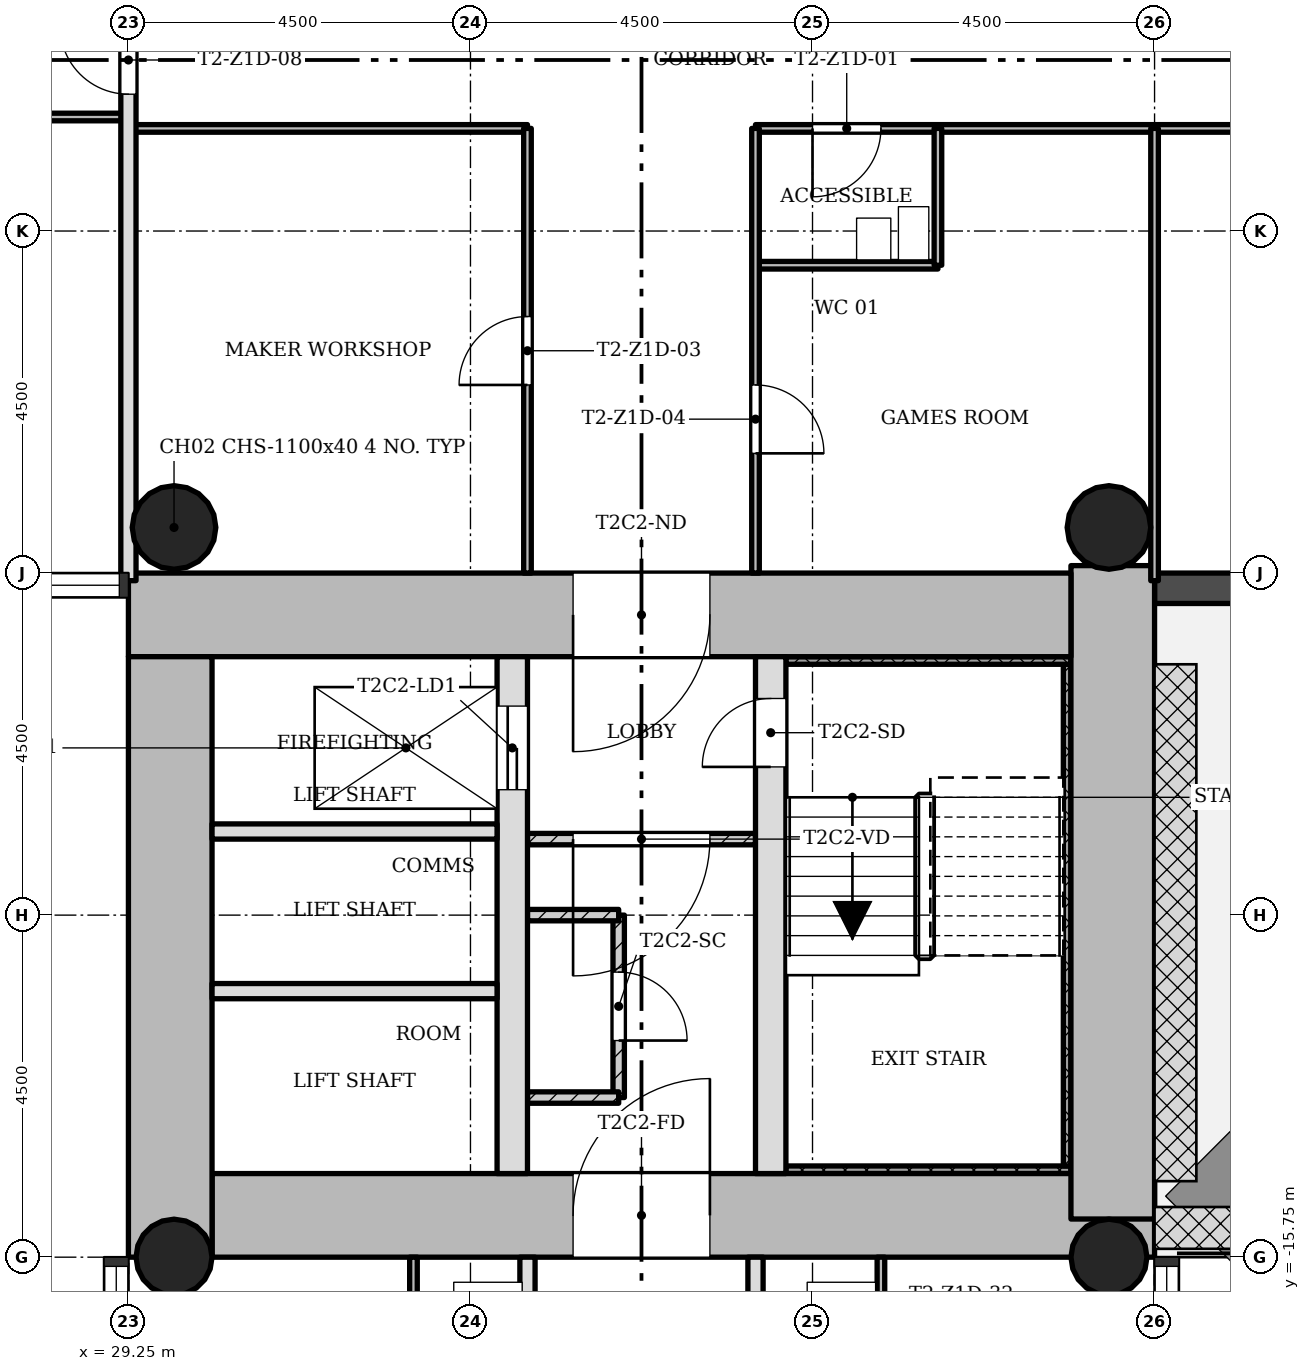
"""IFC4 building model, lengths in metres.
Left out: names, types, materials, properties, quantities, classifications, styles, units other than length and angle.
Written with IfcOpenShell. Run it as: python <this file> out.ifc"""

import sys

from ifc_helpers import new_model, si_unit, direction, frame, frame_2d, origin, origin_2d, place, context, subcontext, project, spatial, rectangle, hollow_circle, extrude, element, fill, save


model = new_model("IFC4")
c1 = context("Model", 3, precision=1e-05, world=origin(), true_north=direction((0.0, 1.0)))
c2 = subcontext(c1, "Body", "Model", "MODEL_VIEW")
j1 = project(units=[si_unit("LENGTHUNIT", "METRE"), si_unit("PLANEANGLEUNIT", "RADIAN")], contexts=[c1])
p1 = place(None, origin())
s1 = spatial("IfcSite", under=j1, at=p1, CompositionType="ELEMENT")
p2 = place(p1, origin())
s2 = spatial("IfcBuilding", under=s1, at=p2, CompositionType="ELEMENT")
p3 = place(p2, frame((0.0, 0.0, 58.5)))
s3 = spatial("IfcBuildingStorey", under=s2, at=p3, CompositionType="ELEMENT", Elevation=58.5)
p4 = place(p3, frame((30.35, -15.2, 0.0), z_axis=(0.0, 0.0, 1.0), x_axis=(1.0, 0.0, 0.0)))
e1 = element("IfcWall", 1, at=p4, inside=s3, PredefinedType="SHEAR", context=c2, shape_type="SweptSolid", body=[
    extrude(rectangle(XDim=12.4, YDim=1.1, at=frame_2d((6.2, 0.0))), origin(), (0.0, 0.0, 1.0), 3.4),
])
p5 = place(p4, frame((4.75, 0.0, 0.0)))
e2 = element("IfcOpeningElement", 2, at=p5, cuts=e1, PredefinedType="OPENING", context=c2, shape_type="SweptSolid", body=[
    extrude(rectangle(XDim=1.8, YDim=2.1, at=frame_2d((0.9, 1.05))), frame((0.0, 0.56, 0.0), z_axis=(0.0, -1.0, 0.0), x_axis=(1.0, 0.0, 0.0)), (0.0, 0.0, 1.0), 1.12),
])
p6 = place(p3, frame((42.2, -15.248, 0.0), z_axis=(0.0, 0.0, 1.0), x_axis=(0.0, 1.0, 0.0)))
e3 = element("IfcWall", 3, at=p6, inside=s3, PredefinedType="SHEAR", context=c2, shape_type="SweptSolid", body=[
    extrude(rectangle(XDim=8.596, YDim=1.1, at=frame_2d((4.298, 0.0))), origin(), (0.0, 0.0, 1.0), 3.4),
])
p7 = place(p3, frame((41.65, -7.3, 0.0), z_axis=(0.0, 0.0, 1.0), x_axis=(-1.0, 0.0, 0.0)))
e4 = element("IfcWall", 4, at=p7, inside=s3, PredefinedType="SHEAR", context=c2, shape_type="SweptSolid", body=[
    extrude(rectangle(XDim=12.4, YDim=1.1, at=frame_2d((6.2, 0.0))), origin(), (0.0, 0.0, 1.0), 3.4),
])
p8 = place(p7, frame((4.75, 0.0, 0.0)))
e5 = element("IfcOpeningElement", 5, at=p8, cuts=e4, PredefinedType="OPENING", context=c2, shape_type="SweptSolid", body=[
    extrude(rectangle(XDim=1.8, YDim=2.1, at=frame_2d((0.9, 1.05))), frame((0.0, 0.56, 0.0), z_axis=(0.0, -1.0, 0.0), x_axis=(1.0, 0.0, 0.0)), (0.0, 0.0, 1.0), 1.12),
])
p9 = place(p3, frame((29.8, -7.85, 0.0), z_axis=(0.0, 0.0, 1.0), x_axis=(0.0, -1.0, 0.0)))
e6 = element("IfcWall", 6, at=p9, inside=s3, PredefinedType="SHEAR", context=c2, shape_type="SweptSolid", body=[
    extrude(rectangle(XDim=7.9, YDim=1.1, at=frame_2d((3.95, 0.0))), origin(), (0.0, 0.0, 1.0), 3.4),
])
p10 = place(p3, frame((34.3, -14.65, 0.0), z_axis=(0.0, 0.0, 1.0), x_axis=(0.0, 1.0, 0.0)))
e7 = element("IfcWall", 7, at=p10, inside=s3, PredefinedType="SHEAR", context=c2, shape_type="SweptSolid", body=[
    extrude(rectangle(XDim=6.8, YDim=0.4, at=frame_2d((3.4, 0.0))), origin(), (0.0, 0.0, 1.0), 3.4),
])
p11 = place(p10, frame((5.05, 0.0, 0.0)))
e8 = element("IfcOpeningElement", 8, at=p11, cuts=e7, PredefinedType="OPENING", context=c2, shape_type="SweptSolid", body=[
    extrude(rectangle(XDim=1.1, YDim=2.1, at=frame_2d((0.55, 1.05))), frame((0.0, 0.21, 0.0), z_axis=(0.0, -1.0, 0.0), x_axis=(1.0, 0.0, 0.0)), (0.0, 0.0, 1.0), 0.42),
])
p12 = place(p3, frame((37.7, -14.65, 0.0), z_axis=(0.0, 0.0, 1.0), x_axis=(0.0, 1.0, 0.0)))
e9 = element("IfcWall", 9, at=p12, inside=s3, PredefinedType="SHEAR", context=c2, shape_type="SweptSolid", body=[
    extrude(rectangle(XDim=6.8, YDim=0.4, at=frame_2d((3.4, 0.0))), origin(), (0.0, 0.0, 1.0), 3.4),
])
p13 = place(p12, frame((5.35, 0.0, 0.0)))
e10 = element("IfcOpeningElement", 10, at=p13, cuts=e9, PredefinedType="OPENING", context=c2, shape_type="SweptSolid", body=[
    extrude(rectangle(XDim=0.9, YDim=2.1, at=frame_2d((0.45, 1.05))), frame((0.0, 0.21, 0.0), z_axis=(0.0, -1.0, 0.0), x_axis=(1.0, 0.0, 0.0)), (0.0, 0.0, 1.0), 0.42),
])
for number, where, z_axis, x_axis in (
    (11, (42.15, -15.75, 0.0), (0.0, 0.0, 1.0), (1.0, 0.0, 0.0)),
    (12, (29.85, -15.75, 0.0), (0.0, 0.0, 1.0), (1.0, 0.0, 0.0)),
):
    element("IfcColumn", number, at=place(p3, frame(where, z_axis=z_axis, x_axis=x_axis)), inside=s3, PredefinedType="COLUMN", context=c2, shape_type="SweptSolid", body=[
        extrude(hollow_circle(Radius=0.5, WallThickness=0.036, at=origin_2d()), origin(), (0.0, 0.0, 1.0), 3.4),
    ])
for number, where, z_axis, x_axis in (
    (13, (42.15, -6.15, 0.0), (0.0, 0.0, 1.0), (1.0, 0.0, 0.0)),
    (14, (29.85, -6.15, 0.0), (0.0, 0.0, 1.0), (1.0, 0.0, 0.0)),
):
    element("IfcColumn", number, at=place(p3, frame(where, z_axis=z_axis, x_axis=x_axis)), inside=s3, PredefinedType="COLUMN", context=c2, shape_type="SweptSolid", body=[
        extrude(hollow_circle(Radius=0.55, WallThickness=0.04, at=origin_2d()), origin(), (0.0, 0.0, 1.0), 3.4),
    ])
p14 = place(p3, frame((42.75, -6.95, -0.02), z_axis=(0.0, 0.0, 1.0), x_axis=(1.0, 0.0, 0.0)))
e15 = element("IfcWall", 15, at=p14, inside=s3, PredefinedType="STANDARD", context=c2, shape_type="SweptSolid", body=[
    extrude(rectangle(XDim=4.5, YDim=0.4, at=frame_2d((2.25, 0.0))), origin(), (0.0, 0.0, 1.0), 3.12),
])
p15 = place(p14, frame((1.35, 0.0, 0.02)))
e16 = element("IfcOpeningElement", 16, at=p15, cuts=e15, PredefinedType="OPENING", context=c2, shape_type="SweptSolid", body=[
    extrude(rectangle(XDim=1.8, YDim=2.1, at=frame_2d((0.9, 1.05))), frame((0.0, 0.21, 0.0), z_axis=(0.0, -1.0, 0.0), x_axis=(1.0, 0.0, 0.0)), (0.0, 0.0, 1.0), 0.42),
])
p16 = place(p3, frame((34.5, -10.25, 0.0), z_axis=(0.0, 0.0, 1.0), x_axis=(1.0, 0.0, 0.0)))
e17 = element("IfcWall", 17, at=p16, inside=s3, PredefinedType="PARTITIONING", context=c2, shape_type="SweptSolid", body=[
    extrude(rectangle(XDim=3.0, YDim=0.15, at=frame_2d((1.5, 0.0))), origin(), (0.0, 0.0, 1.0), 3.0),
])
p17 = place(p16, frame((0.6, 0.0, 0.0)))
e18 = element("IfcOpeningElement", 18, at=p17, cuts=e17, PredefinedType="OPENING", context=c2, shape_type="SweptSolid", body=[
    extrude(rectangle(XDim=1.8, YDim=2.1, at=frame_2d((0.9, 1.05))), frame((0.0, 0.085, 0.0), z_axis=(0.0, -1.0, 0.0), x_axis=(1.0, 0.0, 0.0)), (0.0, 0.0, 1.0), 0.17),
])
for number, where, z_axis, x_axis in (
    (19, (30.35, -10.15, 0.0), (0.0, 0.0, 1.0), (1.0, 0.0, 0.0)),
    (20, (30.35, -12.25, 0.0), (0.0, 0.0, 1.0), (1.0, 0.0, 0.0)),
):
    element("IfcWall", number, at=place(p3, frame(where, z_axis=z_axis, x_axis=x_axis)), inside=s3, PredefinedType="SOLIDWALL", context=c2, shape_type="SweptSolid", body=[
        extrude(rectangle(XDim=3.75, YDim=0.2, at=frame_2d((1.875, 0.0))), origin(), (0.0, 0.0, 1.0), 3.0),
    ])
p18 = place(p3, frame((35.7, -11.25, 0.0), z_axis=(0.0, 0.0, 1.0), x_axis=(0.0, -1.0, 0.0)))
e21 = element("IfcWall", 21, at=p18, inside=s3, PredefinedType="PARTITIONING", context=c2, shape_type="SweptSolid", body=[
    extrude(rectangle(XDim=2.4, YDim=0.15, at=frame_2d((1.2, 0.0))), origin(), (0.0, 0.0, 1.0), 3.0),
])
p19 = place(p18, frame((0.75, 0.0, 0.0)))
e22 = element("IfcOpeningElement", 22, at=p19, cuts=e21, PredefinedType="OPENING", context=c2, shape_type="SweptSolid", body=[
    extrude(rectangle(XDim=0.9, YDim=2.1, at=frame_2d((0.45, 1.05))), frame((0.0, 0.085, 0.0), z_axis=(0.0, -1.0, 0.0), x_axis=(1.0, 0.0, 0.0)), (0.0, 0.0, 1.0), 0.17),
])
for number, where, z_axis, x_axis in (
    (23, (35.7, -11.25, 0.0), (0.0, 0.0, 1.0), (-1.0, 0.0, 0.0)),
    (24, (35.7, -13.65, 0.0), (0.0, 0.0, 1.0), (-1.0, 0.0, 0.0)),
):
    element("IfcWall", number, at=place(p3, frame(where, z_axis=z_axis, x_axis=x_axis)), inside=s3, PredefinedType="PARTITIONING", context=c2, shape_type="SweptSolid", body=[
        extrude(rectangle(XDim=1.2, YDim=0.15, at=frame_2d((0.6, 0.0))), origin(), (0.0, 0.0, 1.0), 3.0),
    ])
p20 = place(p3, frame((39.9, -2.7, 0.0), z_axis=(0.0, 0.0, 1.0), x_axis=(-1.0, 0.0, 0.0)))
e25 = element("IfcWall", 25, at=p20, inside=s3, PredefinedType="PARTITIONING", context=c2, shape_type="SweptSolid", body=[
    extrude(rectangle(XDim=2.4, YDim=0.1, at=frame_2d((1.2, 0.0))), origin(), (0.0, 0.0, 1.0), 3.0),
])
p21 = place(p3, frame((44.55, -0.9, 0.0), z_axis=(0.0, 0.0, 1.0), x_axis=(-1.0, 0.0, 0.0)))
e26 = element("IfcWall", 26, at=p21, inside=s3, PredefinedType="PARTITIONING", context=c2, shape_type="SweptSolid", body=[
    extrude(rectangle(XDim=7.05, YDim=0.1, at=frame_2d((3.525, 0.0))), origin(), (0.0, 0.0, 1.0), 3.0),
])
p22 = place(p21, frame((5.4, 0.0, 0.0)))
e27 = element("IfcOpeningElement", 27, at=p22, cuts=e26, PredefinedType="OPENING", context=c2, shape_type="SweptSolid", body=[
    extrude(rectangle(XDim=0.9, YDim=2.1, at=frame_2d((0.45, 1.05))), frame((0.0, 0.06, 0.0), z_axis=(0.0, -1.0, 0.0), x_axis=(1.0, 0.0, 0.0)), (0.0, 0.0, 1.0), 0.12),
])
p23 = place(p3, frame((34.5, -0.9, 0.0), z_axis=(0.0, 0.0, 1.0), x_axis=(-1.0, 0.0, 0.0)))
e28 = element("IfcWall", 28, at=p23, inside=s3, PredefinedType="PARTITIONING", context=c2, shape_type="SweptSolid", body=[
    extrude(rectangle(XDim=5.25, YDim=0.1, at=frame_2d((2.625, 0.0))), origin(), (0.0, 0.0, 1.0), 3.0),
])
p24 = place(p3, frame((29.25, -0.75, 0.0), z_axis=(0.0, 0.0, 1.0), x_axis=(-1.0, 0.0, 0.0)))
e29 = element("IfcWall", 29, at=p24, inside=s3, PredefinedType="PARTITIONING", context=c2, shape_type="SweptSolid", body=[
    extrude(rectangle(XDim=4.5, YDim=0.1, at=frame_2d((2.25, 0.0))), origin(), (0.0, 0.0, 1.0), 3.0),
])
p25 = place(p24, frame((1.8, 0.0, 0.0)))
e30 = element("IfcOpeningElement", 30, at=p25, cuts=e29, PredefinedType="OPENING", context=c2, shape_type="SweptSolid", body=[
    extrude(rectangle(XDim=0.9, YDim=2.1, at=frame_2d((0.45, 1.05))), frame((0.0, 0.06, 0.0), z_axis=(0.0, -1.0, 0.0), x_axis=(1.0, 0.0, 0.0)), (0.0, 0.0, 1.0), 0.12),
])
p26 = place(p3, frame((42.75, -6.85, 0.0), z_axis=(0.0, 0.0, 1.0), x_axis=(0.0, 1.0, 0.0)))
e31 = element("IfcWall", 31, at=p26, inside=s3, PredefinedType="PARTITIONING", context=c2, shape_type="SweptSolid", body=[
    extrude(rectangle(XDim=5.95, YDim=0.1, at=frame_2d((2.975, 0.0))), origin(), (0.0, 0.0, 1.0), 3.0),
])
p27 = place(p3, frame((39.9, -2.7, 0.0), z_axis=(0.0, 0.0, 1.0), x_axis=(0.0, 1.0, 0.0)))
e32 = element("IfcWall", 32, at=p27, inside=s3, PredefinedType="PARTITIONING", context=c2, shape_type="SweptSolid", body=[
    extrude(rectangle(XDim=1.8, YDim=0.1, at=frame_2d((0.9, 0.0))), origin(), (0.0, 0.0, 1.0), 3.0),
])
p28 = place(p3, frame((39.15, -20.25, 0.0), z_axis=(0.0, 0.0, 1.0), x_axis=(0.0, 1.0, 0.0)))
e33 = element("IfcWall", 33, at=p28, inside=s3, PredefinedType="PARTITIONING", context=c2, shape_type="SweptSolid", body=[
    extrude(rectangle(XDim=4.5, YDim=0.1, at=frame_2d((2.25, 0.0))), origin(), (0.0, 0.0, 1.0), 3.0),
])
p29 = place(p28, frame((0.6, 0.0, 0.0)))
e34 = element("IfcOpeningElement", 34, at=p29, cuts=e33, PredefinedType="OPENING", context=c2, shape_type="SweptSolid", body=[
    extrude(rectangle(XDim=0.9, YDim=2.1, at=frame_2d((0.45, 1.05))), frame((0.0, 0.06, 0.0), z_axis=(0.0, -1.0, 0.0), x_axis=(1.0, 0.0, 0.0)), (0.0, 0.0, 1.0), 0.12),
])
p30 = place(p3, frame((37.5, -6.75, 0.0), z_axis=(0.0, 0.0, 1.0), x_axis=(0.0, 1.0, 0.0)))
e35 = element("IfcWall", 35, at=p30, inside=s3, PredefinedType="PARTITIONING", context=c2, shape_type="SweptSolid", body=[
    extrude(rectangle(XDim=5.85, YDim=0.1, at=frame_2d((2.925, 0.0))), origin(), (0.0, 0.0, 1.0), 3.0),
])
p31 = place(p30, frame((1.575, 0.0, 0.0)))
e36 = element("IfcOpeningElement", 36, at=p31, cuts=e35, PredefinedType="OPENING", context=c2, shape_type="SweptSolid", body=[
    extrude(rectangle(XDim=0.9, YDim=2.1, at=frame_2d((0.45, 1.05))), frame((0.0, 0.06, 0.0), z_axis=(0.0, -1.0, 0.0), x_axis=(1.0, 0.0, 0.0)), (0.0, 0.0, 1.0), 0.12),
])
p32 = place(p3, frame((37.5, -20.25, 0.0), z_axis=(0.0, 0.0, 1.0), x_axis=(0.0, 1.0, 0.0)))
e37 = element("IfcWall", 37, at=p32, inside=s3, PredefinedType="SOLIDWALL", context=c2, shape_type="SweptSolid", body=[
    extrude(rectangle(XDim=4.5, YDim=0.2, at=frame_2d((2.25, 0.0))), origin(), (0.0, 0.0, 1.0), 3.0),
])
p33 = place(p32, frame((0.6, 0.0, 0.0)))
e38 = element("IfcOpeningElement", 38, at=p33, cuts=e37, PredefinedType="OPENING", context=c2, shape_type="SweptSolid", body=[
    extrude(rectangle(XDim=0.9, YDim=2.1, at=frame_2d((0.45, 1.05))), frame((0.0, 0.11, 0.0), z_axis=(0.0, -1.0, 0.0), x_axis=(1.0, 0.0, 0.0)), (0.0, 0.0, 1.0), 0.22),
])
p34 = place(p3, frame((34.5, -6.75, 0.0), z_axis=(0.0, 0.0, 1.0), x_axis=(0.0, 1.0, 0.0)))
e39 = element("IfcWall", 39, at=p34, inside=s3, PredefinedType="PARTITIONING", context=c2, shape_type="SweptSolid", body=[
    extrude(rectangle(XDim=5.85, YDim=0.1, at=frame_2d((2.925, 0.0))), origin(), (0.0, 0.0, 1.0), 3.0),
])
p35 = place(p34, frame((2.475, 0.0, 0.0)))
e40 = element("IfcOpeningElement", 40, at=p35, cuts=e39, PredefinedType="OPENING", context=c2, shape_type="SweptSolid", body=[
    extrude(rectangle(XDim=0.9, YDim=2.1, at=frame_2d((0.45, 1.05))), frame((0.0, 0.06, 0.0), z_axis=(0.0, -1.0, 0.0), x_axis=(1.0, 0.0, 0.0)), (0.0, 0.0, 1.0), 0.12),
])
p36 = place(p3, frame((34.5, -20.25, 0.0), z_axis=(0.0, 0.0, 1.0), x_axis=(0.0, 1.0, 0.0)))
e41 = element("IfcWall", 41, at=p36, inside=s3, PredefinedType="SOLIDWALL", context=c2, shape_type="SweptSolid", body=[
    extrude(rectangle(XDim=4.5, YDim=0.2, at=frame_2d((2.25, 0.0))), origin(), (0.0, 0.0, 1.0), 3.0),
])
p37 = place(p36, frame((0.6, 0.0, 0.0)))
e42 = element("IfcOpeningElement", 42, at=p37, cuts=e41, PredefinedType="OPENING", context=c2, shape_type="SweptSolid", body=[
    extrude(rectangle(XDim=0.9, YDim=2.1, at=frame_2d((0.45, 1.05))), frame((0.0, 0.11, 0.0), z_axis=(0.0, -1.0, 0.0), x_axis=(1.0, 0.0, 0.0)), (0.0, 0.0, 1.0), 0.22),
])
p38 = place(p3, frame((33.0, -18.15, 0.0), z_axis=(0.0, 0.0, 1.0), x_axis=(0.0, 1.0, 0.0)))
e43 = element("IfcWall", 43, at=p38, inside=s3, PredefinedType="PARTITIONING", context=c2, shape_type="SweptSolid", body=[
    extrude(rectangle(XDim=2.4, YDim=0.1, at=frame_2d((1.2, 0.0))), origin(), (0.0, 0.0, 1.0), 3.0),
])
p39 = place(p38, frame((0.75, 0.0, 0.0)))
e44 = element("IfcOpeningElement", 44, at=p39, cuts=e43, PredefinedType="OPENING", context=c2, shape_type="SweptSolid", body=[
    extrude(rectangle(XDim=0.9, YDim=2.1, at=frame_2d((0.45, 1.05))), frame((0.0, 0.06, 0.0), z_axis=(0.0, -1.0, 0.0), x_axis=(1.0, 0.0, 0.0)), (0.0, 0.0, 1.0), 0.12),
])
p40 = place(p3, frame((29.25, -6.85, 0.0), z_axis=(0.0, 0.0, 1.0), x_axis=(0.0, 1.0, 0.0)))
e45 = element("IfcWall", 45, at=p40, inside=s3, PredefinedType="SOLIDWALL", context=c2, shape_type="SweptSolid", body=[
    extrude(rectangle(XDim=13.7, YDim=0.2, at=frame_2d((6.85, 0.0))), origin(), (0.0, 0.0, 1.0), 3.0),
])
p41 = place(p40, frame((6.4, 0.0, 0.0)))
e46 = element("IfcOpeningElement", 46, at=p41, cuts=e45, PredefinedType="OPENING", context=c2, shape_type="SweptSolid", body=[
    extrude(rectangle(XDim=0.9, YDim=2.1, at=frame_2d((0.45, 1.05))), frame((0.0, 0.11, 0.0), z_axis=(0.0, -1.0, 0.0), x_axis=(1.0, 0.0, 0.0)), (0.0, 0.0, 1.0), 0.22),
])
p42 = place(p3, frame((37.9, -14.6, 0.0), z_axis=(0.0, 0.0, 1.0), x_axis=(1.0, 0.0, 0.0)))
e47 = element("IfcWall", 47, at=p42, inside=s3, PredefinedType="SHEAR", context=c2, shape_type="SweptSolid", body=[
    extrude(rectangle(XDim=3.75, YDim=0.1, at=frame_2d((1.875, 0.0))), origin(), (0.0, 0.0, 1.0), 3.4),
])
p43 = place(p3, frame((41.6, -7.95, 0.0), z_axis=(0.0, 0.0, 1.0), x_axis=(0.0, -1.0, 0.0)))
e48 = element("IfcWall", 48, at=p43, inside=s3, PredefinedType="SHEAR", context=c2, shape_type="SweptSolid", body=[
    extrude(rectangle(XDim=6.6, YDim=0.1, at=frame_2d((3.3, 0.0))), origin(), (0.0, 0.0, 1.0), 3.4),
])
p44 = place(p3, frame((37.9, -7.9, 0.0), z_axis=(0.0, 0.0, 1.0), x_axis=(1.0, 0.0, 0.0)))
e49 = element("IfcWall", 49, at=p44, inside=s3, PredefinedType="SHEAR", context=c2, shape_type="SweptSolid", body=[
    extrude(rectangle(XDim=3.75, YDim=0.1, at=frame_2d((1.875, 0.0))), origin(), (0.0, 0.0, 1.0), 3.4),
])
p45 = place(p17, origin())
e50 = element("IfcDoor", 50, at=p45, inside=s3, OperationType="SINGLE_SWING_LEFT", PredefinedType="DOOR", context=c2, shape_type="SweptSolid", body=[
    extrude(rectangle(XDim=1.8, YDim=2.1, at=frame_2d((0.9, 1.05))), frame((0.0, 0.025, 0.0), z_axis=(0.0, -1.0, 0.0), x_axis=(1.0, 0.0, 0.0)), (0.0, 0.0, 1.0), 0.05),
])
fill(e18, e50)
p46 = place(p19, origin())
e51 = element("IfcDoor", 51, at=p46, inside=s3, OperationType="SINGLE_SWING_LEFT", PredefinedType="DOOR", context=c2, shape_type="SweptSolid", body=[
    extrude(rectangle(XDim=0.9, YDim=2.1, at=frame_2d((0.45, 1.05))), frame((0.0, 0.025, 0.0), z_axis=(0.0, -1.0, 0.0), x_axis=(1.0, 0.0, 0.0)), (0.0, 0.0, 1.0), 0.05),
])
fill(e22, e51)
p47 = place(p22, origin())
e52 = element("IfcDoor", 52, at=p47, inside=s3, OperationType="SINGLE_SWING_LEFT", PredefinedType="DOOR", context=c2, shape_type="SweptSolid", body=[
    extrude(rectangle(XDim=0.9, YDim=2.1, at=frame_2d((0.45, 1.05))), frame((0.0, 0.025, 0.0), z_axis=(0.0, -1.0, 0.0), x_axis=(1.0, 0.0, 0.0)), (0.0, 0.0, 1.0), 0.05),
])
fill(e27, e52)
p48 = place(p35, origin())
e53 = element("IfcDoor", 53, at=p48, inside=s3, OperationType="SINGLE_SWING_RIGHT", PredefinedType="DOOR", context=c2, shape_type="SweptSolid", body=[
    extrude(rectangle(XDim=0.9, YDim=2.1, at=frame_2d((0.45, 1.05))), frame((0.0, 0.025, 0.0), z_axis=(0.0, -1.0, 0.0), x_axis=(1.0, 0.0, 0.0)), (0.0, 0.0, 1.0), 0.05),
])
fill(e40, e53)
p49 = place(p31, origin())
e54 = element("IfcDoor", 54, at=p49, inside=s3, OperationType="SINGLE_SWING_LEFT", PredefinedType="DOOR", context=c2, shape_type="SweptSolid", body=[
    extrude(rectangle(XDim=0.9, YDim=2.1, at=frame_2d((0.45, 1.05))), frame((0.0, 0.025, 0.0), z_axis=(0.0, -1.0, 0.0), x_axis=(1.0, 0.0, 0.0)), (0.0, 0.0, 1.0), 0.05),
])
fill(e36, e54)
p50 = place(p41, origin())
e55 = element("IfcDoor", 55, at=p50, inside=s3, OperationType="SINGLE_SWING_LEFT", PredefinedType="DOOR", context=c2, shape_type="SweptSolid", body=[
    extrude(rectangle(XDim=0.9, YDim=2.1, at=frame_2d((0.45, 1.05))), frame((0.0, 0.025, 0.0), z_axis=(0.0, -1.0, 0.0), x_axis=(1.0, 0.0, 0.0)), (0.0, 0.0, 1.0), 0.05),
])
fill(e46, e55)
p51 = place(p13, origin())
e56 = element("IfcDoor", 56, at=p51, inside=s3, OperationType="SINGLE_SWING_RIGHT", PredefinedType="DOOR", context=c2, shape_type="SweptSolid", body=[
    extrude(rectangle(XDim=0.9, YDim=2.1, at=frame_2d((0.45, 1.05))), frame((0.0, 0.025, 0.0), z_axis=(0.0, -1.0, 0.0), x_axis=(1.0, 0.0, 0.0)), (0.0, 0.0, 1.0), 0.05),
])
fill(e10, e56)
p52 = place(p11, origin())
e57 = element("IfcDoor", 57, at=p52, inside=s3, OperationType="SLIDING_TO_LEFT", PredefinedType="DOOR", context=c2, shape_type="SweptSolid", body=[
    extrude(rectangle(XDim=1.1, YDim=2.1, at=frame_2d((0.55, 1.05))), frame((0.0, 0.025, 0.0), z_axis=(0.0, -1.0, 0.0), x_axis=(1.0, 0.0, 0.0)), (0.0, 0.0, 1.0), 0.05),
])
fill(e8, e57)
p53 = place(p8, origin())
e58 = element("IfcDoor", 58, at=p53, inside=s3, OperationType="SINGLE_SWING_LEFT", PredefinedType="DOOR", context=c2, shape_type="SweptSolid", body=[
    extrude(rectangle(XDim=1.8, YDim=2.1, at=frame_2d((0.9, 1.05))), frame((0.0, 0.025, 0.0), z_axis=(0.0, -1.0, 0.0), x_axis=(1.0, 0.0, 0.0)), (0.0, 0.0, 1.0), 0.05),
])
fill(e5, e58)
p54 = place(p5, origin())
e59 = element("IfcDoor", 59, at=p54, inside=s3, OperationType="SINGLE_SWING_LEFT", PredefinedType="DOOR", context=c2, shape_type="SweptSolid", body=[
    extrude(rectangle(XDim=1.8, YDim=2.1, at=frame_2d((0.9, 1.05))), frame((0.0, 0.025, 0.0), z_axis=(0.0, -1.0, 0.0), x_axis=(1.0, 0.0, 0.0)), (0.0, 0.0, 1.0), 0.05),
])
fill(e2, e59)
save(model, sys.argv[1])
